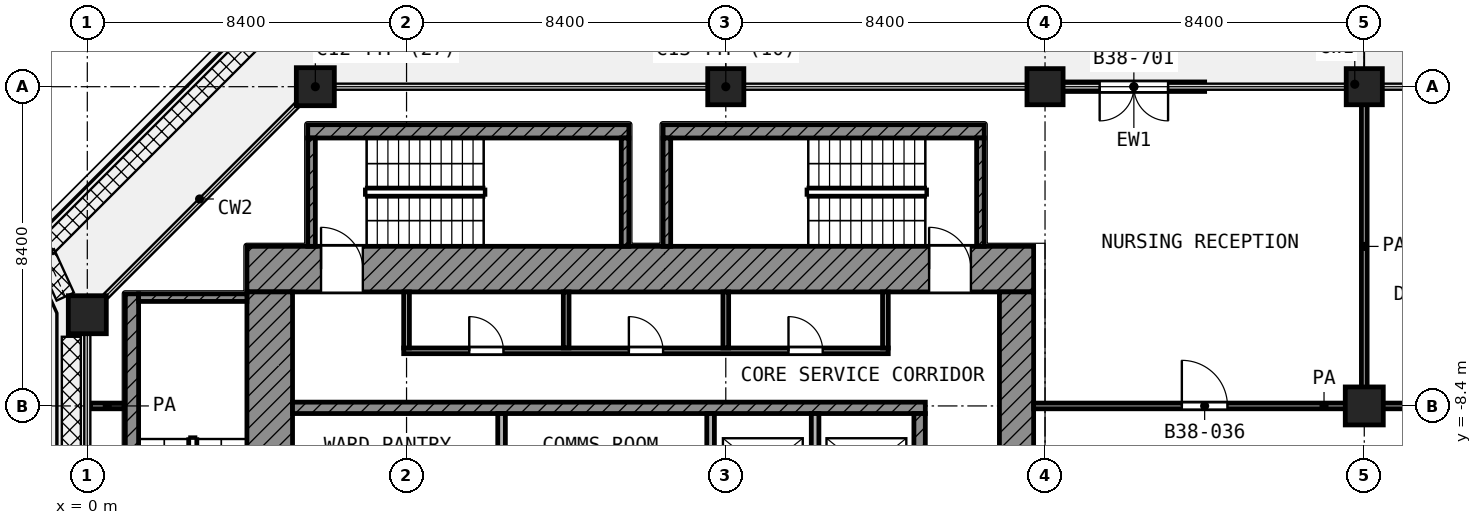
"""IFC4 building model, lengths in metres.
Left out: names, types, materials, properties, quantities, classifications, styles, units other than length and angle.
Written with IfcOpenShell. Run it as: python <this file> out.ifc"""

import sys

from ifc_helpers import new_model, si_unit, direction, frame, frame_2d, origin, origin_2d, place, context, subcontext, project, spatial, rectangle, extrude, element, fill, save


model = new_model("IFC4")
c1 = context("Model", 3, precision=1e-05, world=origin(), true_north=direction((0.0, 1.0)))
c2 = subcontext(c1, "Body", "Model", "MODEL_VIEW")
j1 = project(units=[si_unit("LENGTHUNIT", "METRE"), si_unit("PLANEANGLEUNIT", "RADIAN")], contexts=[c1])
p1 = place(None, origin())
s1 = spatial("IfcSite", under=j1, at=p1, CompositionType="ELEMENT")
p2 = place(p1, origin())
s2 = spatial("IfcBuilding", under=s1, at=p2, CompositionType="ELEMENT")
p3 = place(p2, frame((0.0, 0.0, 166.8)))
s3 = spatial("IfcBuildingStorey", under=s2, at=p3, CompositionType="ELEMENT", Elevation=166.8)
p4 = place(p3, frame((6.0, 0.0, 0.0), z_axis=(0.0, 0.0, 1.0), x_axis=(1.0, 0.0, 0.0)))
e1 = element("IfcColumn", 1, at=p4, inside=s3, PredefinedType="COLUMN", context=c2, shape_type="SweptSolid", body=[
    extrude(rectangle(XDim=1.0, YDim=1.0, at=origin_2d()), origin(), (0.0, 0.0, 1.0), 4.2),
])
for number, where, z_axis, x_axis in (
    (2, (16.8, 0.0, 0.0), (0.0, 0.0, 1.0), (1.0, 0.0, 0.0)),
    (3, (25.2, 0.0, 0.0), (0.0, 0.0, 1.0), (1.0, 0.0, 0.0)),
    (4, (33.6, 0.0, 0.0), (0.0, 0.0, 1.0), (1.0, 0.0, 0.0)),
):
    element("IfcColumn", number, at=place(p3, frame(where, z_axis=z_axis, x_axis=x_axis)), inside=s3, PredefinedType="COLUMN", context=c2, shape_type="SweptSolid", body=[
        extrude(rectangle(XDim=0.95, YDim=0.95, at=origin_2d()), origin(), (0.0, 0.0, 1.0), 4.2),
    ])
for number, where, z_axis, x_axis in (
    (5, (0.0, -6.0, 0.0), (0.0, 0.0, 1.0), (1.0, 0.0, 0.0)),
    (6, (33.6, -8.4, 0.0), (0.0, 0.0, 1.0), (1.0, 0.0, 0.0)),
):
    element("IfcColumn", number, at=place(p3, frame(where, z_axis=z_axis, x_axis=x_axis)), inside=s3, PredefinedType="COLUMN", context=c2, shape_type="SweptSolid", body=[
        extrude(rectangle(XDim=1.0, YDim=1.0, at=origin_2d()), origin(), (0.0, 0.0, 1.0), 4.2),
    ])
p5 = place(p3, frame((29.4, 0.0, 0.0), z_axis=(0.0, 0.0, 1.0), x_axis=(-1.0, 0.0, 0.0)))
e7 = element("IfcWall", 7, at=p5, inside=s3, PredefinedType="SOLIDWALL", context=c2, shape_type="SweptSolid", body=[
    extrude(rectangle(XDim=3.725, YDim=0.25, at=frame_2d((1.862, 0.0))), origin(), (0.0, 0.0, 1.0), 2.58),
])
p6 = place(p5, frame((0.962, 0.0, 0.0)))
e8 = element("IfcOpeningElement", 8, at=p6, cuts=e7, PredefinedType="OPENING", context=c2, shape_type="SweptSolid", body=[
    extrude(rectangle(XDim=1.8, YDim=2.1, at=frame_2d((0.9, 1.05))), frame((0.0, 0.135, 0.0), z_axis=(0.0, -1.0, 0.0), x_axis=(1.0, 0.0, 0.0)), (0.0, 0.0, 1.0), 0.27),
])
p7 = place(p3, frame((4.2, -4.8, 0.0), z_axis=(0.0, 0.0, 1.0), x_axis=(1.0, 0.0, 0.0)))
e9 = element("IfcWall", 9, at=p7, inside=s3, PredefinedType="SHEAR", context=c2, shape_type="SweptSolid", body=[
    extrude(rectangle(XDim=20.7, YDim=1.2, at=frame_2d((10.35, 0.0))), origin(), (0.0, 0.0, 1.0), 3.6),
])
p8 = place(p7, frame((1.95, 0.0, 0.0)))
e10 = element("IfcOpeningElement", 10, at=p8, cuts=e9, PredefinedType="OPENING", context=c2, shape_type="SweptSolid", body=[
    extrude(rectangle(XDim=1.1, YDim=2.1, at=frame_2d((0.55, 1.05))), frame((0.0, 0.61, 0.0), z_axis=(0.0, -1.0, 0.0), x_axis=(1.0, 0.0, 0.0)), (0.0, 0.0, 1.0), 1.22),
])
p9 = place(p7, frame((17.95, 0.0, 0.0)))
e11 = element("IfcOpeningElement", 11, at=p9, cuts=e9, PredefinedType="OPENING", context=c2, shape_type="SweptSolid", body=[
    extrude(rectangle(XDim=1.1, YDim=2.1, at=frame_2d((0.55, 1.05))), frame((0.0, 0.61, 0.0), z_axis=(0.0, -1.0, 0.0), x_axis=(1.0, 0.0, 0.0)), (0.0, 0.0, 1.0), 1.22),
])
p10 = place(p3, frame((4.8, -24.9, 0.0), z_axis=(0.0, 0.0, 1.0), x_axis=(0.0, 1.0, 0.0)))
e12 = element("IfcWall", 12, at=p10, inside=s3, PredefinedType="SHEAR", context=c2, shape_type="SweptSolid", body=[
    extrude(rectangle(XDim=19.5, YDim=1.2, at=frame_2d((9.75, 0.0))), origin(), (0.0, 0.0, 1.0), 3.6),
])
p11 = place(p10, frame((11.35, 0.0, 0.0)))
e13 = element("IfcOpeningElement", 13, at=p11, cuts=e12, PredefinedType="OPENING", context=c2, shape_type="SweptSolid", body=[
    extrude(rectangle(XDim=1.1, YDim=2.1, at=frame_2d((0.55, 1.05))), frame((0.0, 0.61, 0.0), z_axis=(0.0, -1.0, 0.0), x_axis=(1.0, 0.0, 0.0)), (0.0, 0.0, 1.0), 1.22),
])
p12 = place(p10, frame((2.05, 0.0, 0.0)))
e14 = element("IfcOpeningElement", 14, at=p12, cuts=e12, PredefinedType="OPENING", context=c2, shape_type="SweptSolid", body=[
    extrude(rectangle(XDim=1.1, YDim=2.1, at=frame_2d((0.55, 1.05))), frame((0.0, 0.61, 0.0), z_axis=(0.0, -1.0, 0.0), x_axis=(1.0, 0.0, 0.0)), (0.0, 0.0, 1.0), 1.22),
])
p13 = place(p3, frame((24.45, -24.0, 0.0), z_axis=(0.0, 0.0, 1.0), x_axis=(0.0, 1.0, 0.0)))
e15 = element("IfcWall", 15, at=p13, inside=s3, PredefinedType="SHEAR", context=c2, shape_type="SweptSolid", body=[
    extrude(rectangle(XDim=18.6, YDim=0.9, at=frame_2d((9.3, 0.0))), origin(), (0.0, 0.0, 1.0), 3.6),
])
p14 = place(p13, frame((10.5, 0.0, 0.0)))
e16 = element("IfcOpeningElement", 16, at=p14, cuts=e15, PredefinedType="OPENING", context=c2, shape_type="SweptSolid", body=[
    extrude(rectangle(XDim=1.8, YDim=2.1, at=frame_2d((0.9, 1.05))), frame((0.0, 0.46, 0.0), z_axis=(0.0, -1.0, 0.0), x_axis=(1.0, 0.0, 0.0)), (0.0, 0.0, 1.0), 0.92),
])
p15 = place(p3, frame((5.4, -8.45, 0.0), z_axis=(0.0, 0.0, 1.0), x_axis=(1.0, 0.0, 0.0)))
e17 = element("IfcWall", 17, at=p15, inside=s3, PredefinedType="SHEAR", context=c2, shape_type="SweptSolid", body=[
    extrude(rectangle(XDim=16.65, YDim=0.3, at=frame_2d((8.325, 0.0))), origin(), (0.0, 0.0, 1.0), 3.6),
])
p16 = place(p3, frame((21.9, -10.95, 0.0), z_axis=(0.0, 0.0, 1.0), x_axis=(0.0, 1.0, 0.0)))
e18 = element("IfcWall", 18, at=p16, inside=s3, PredefinedType="SHEAR", context=c2, shape_type="SweptSolid", body=[
    extrude(rectangle(XDim=2.35, YDim=0.3, at=frame_2d((1.175, 0.0))), origin(), (0.0, 0.0, 1.0), 3.6),
])
for number, where, z_axis, x_axis in (
    (19, (10.9, -10.95, 0.0), (0.0, 0.0, 1.0), (0.0, 1.0, 0.0)),
    (20, (16.4, -10.95, 0.0), (0.0, 0.0, 1.0), (0.0, 1.0, 0.0)),
    (21, (19.15, -10.95, 0.0), (0.0, 0.0, 1.0), (0.0, 1.0, 0.0)),
):
    element("IfcWall", number, at=place(p3, frame(where, z_axis=z_axis, x_axis=x_axis)), inside=s3, PredefinedType="PARTITIONING", context=c2, shape_type="SweptSolid", body=[
        extrude(rectangle(XDim=2.35, YDim=0.2, at=frame_2d((1.175, 0.0))), origin(), (0.0, 0.0, 1.0), 3.6),
    ])
p17 = place(p3, frame((8.325, -6.95, 0.0), z_axis=(0.0, 0.0, 1.0), x_axis=(1.0, 0.0, 0.0)))
e22 = element("IfcWall", 22, at=p17, inside=s3, PredefinedType="PARTITIONING", context=c2, shape_type="SweptSolid", body=[
    extrude(rectangle(XDim=12.75, YDim=0.15, at=frame_2d((6.375, 0.0))), origin(), (0.0, 0.0, 1.0), 3.6),
])
p18 = place(p17, frame((1.725, 0.0, 0.0)))
e23 = element("IfcOpeningElement", 23, at=p18, cuts=e22, PredefinedType="OPENING", context=c2, shape_type="SweptSolid", body=[
    extrude(rectangle(XDim=0.9, YDim=2.1, at=frame_2d((0.45, 1.05))), frame((0.0, 0.085, 0.0), z_axis=(0.0, -1.0, 0.0), x_axis=(1.0, 0.0, 0.0)), (0.0, 0.0, 1.0), 0.17),
])
p19 = place(p17, frame((5.925, 0.0, 0.0)))
e24 = element("IfcOpeningElement", 24, at=p19, cuts=e22, PredefinedType="OPENING", context=c2, shape_type="SweptSolid", body=[
    extrude(rectangle(XDim=0.9, YDim=2.1, at=frame_2d((0.45, 1.05))), frame((0.0, 0.085, 0.0), z_axis=(0.0, -1.0, 0.0), x_axis=(1.0, 0.0, 0.0)), (0.0, 0.0, 1.0), 0.17),
])
p20 = place(p17, frame((10.125, 0.0, 0.0)))
e25 = element("IfcOpeningElement", 25, at=p20, cuts=e22, PredefinedType="OPENING", context=c2, shape_type="SweptSolid", body=[
    extrude(rectangle(XDim=0.9, YDim=2.1, at=frame_2d((0.45, 1.05))), frame((0.0, 0.085, 0.0), z_axis=(0.0, -1.0, 0.0), x_axis=(1.0, 0.0, 0.0)), (0.0, 0.0, 1.0), 0.17),
])
for number, where, z_axis, x_axis in (
    (26, (8.4, -6.875, 0.0), (0.0, 0.0, 1.0), (0.0, 1.0, 0.0)),
    (27, (12.6, -6.875, 0.0), (0.0, 0.0, 1.0), (0.0, 1.0, 0.0)),
    (28, (16.8, -6.875, 0.0), (0.0, 0.0, 1.0), (0.0, 1.0, 0.0)),
    (29, (21.0, -6.875, 0.0), (0.0, 0.0, 1.0), (0.0, 1.0, 0.0)),
):
    element("IfcWall", number, at=place(p3, frame(where, z_axis=z_axis, x_axis=x_axis)), inside=s3, PredefinedType="PARTITIONING", context=c2, shape_type="SweptSolid", body=[
        extrude(rectangle(XDim=1.475, YDim=0.15, at=frame_2d((0.738, 0.0))), origin(), (0.0, 0.0, 1.0), 3.6),
    ])
p21 = place(p3, frame((1.175, -13.9, 0.0), z_axis=(0.0, 0.0, 1.0), x_axis=(0.0, 1.0, 0.0)))
e30 = element("IfcWall", 30, at=p21, inside=s3, PredefinedType="SHEAR", context=c2, shape_type="SweptSolid", body=[
    extrude(rectangle(XDim=8.45, YDim=0.35, at=frame_2d((4.225, 0.0))), origin(), (0.0, 0.0, 1.0), 3.6),
])
p22 = place(p3, frame((1.35, -5.55, 0.0), z_axis=(0.0, 0.0, 1.0), x_axis=(1.0, 0.0, 0.0)))
e31 = element("IfcWall", 31, at=p22, inside=s3, PredefinedType="SHEAR", context=c2, shape_type="SweptSolid", body=[
    extrude(rectangle(XDim=2.85, YDim=0.2, at=frame_2d((1.425, 0.0))), origin(), (0.0, 0.0, 1.0), 3.6),
])
p23 = place(p3, frame((5.8, -1.175, 0.0), z_axis=(0.0, 0.0, 1.0), x_axis=(1.0, 0.0, 0.0)))
e32 = element("IfcWall", 32, at=p23, inside=s3, PredefinedType="SHEAR", context=c2, shape_type="SweptSolid", body=[
    extrude(rectangle(XDim=8.45, YDim=0.35, at=frame_2d((4.225, 0.0))), origin(), (0.0, 0.0, 1.0), 3.6),
])
for number, where, z_axis, x_axis in (
    (33, (5.9, -4.2, 0.0), (0.0, 0.0, 1.0), (0.0, 1.0, 0.0)),
    (34, (14.15, -4.2, 0.0), (0.0, 0.0, 1.0), (0.0, 1.0, 0.0)),
):
    element("IfcWall", number, at=place(p3, frame(where, z_axis=z_axis, x_axis=x_axis)), inside=s3, PredefinedType="SHEAR", context=c2, shape_type="SweptSolid", body=[
        extrude(rectangle(XDim=2.85, YDim=0.2, at=frame_2d((1.425, 0.0))), origin(), (0.0, 0.0, 1.0), 3.6),
    ])
p24 = place(p3, frame((15.15, -1.175, 0.0), z_axis=(0.0, 0.0, 1.0), x_axis=(1.0, 0.0, 0.0)))
e35 = element("IfcWall", 35, at=p24, inside=s3, PredefinedType="SHEAR", context=c2, shape_type="SweptSolid", body=[
    extrude(rectangle(XDim=8.45, YDim=0.35, at=frame_2d((4.225, 0.0))), origin(), (0.0, 0.0, 1.0), 3.6),
])
for number, where, z_axis, x_axis in (
    (36, (15.25, -4.2, 0.0), (0.0, 0.0, 1.0), (0.0, 1.0, 0.0)),
    (37, (23.5, -4.2, 0.0), (0.0, 0.0, 1.0), (0.0, 1.0, 0.0)),
):
    element("IfcWall", number, at=place(p3, frame(where, z_axis=z_axis, x_axis=x_axis)), inside=s3, PredefinedType="SHEAR", context=c2, shape_type="SweptSolid", body=[
        extrude(rectangle(XDim=2.85, YDim=0.2, at=frame_2d((1.425, 0.0))), origin(), (0.0, 0.0, 1.0), 3.6),
    ])
p25 = place(p3, frame((0.08, -8.4, 0.0), z_axis=(0.0, 0.0, 1.0), x_axis=(1.0, 0.0, 0.0)))
e38 = element("IfcWall", 38, at=p25, inside=s3, PredefinedType="PARTITIONING", context=c2, shape_type="SweptSolid", body=[
    extrude(rectangle(XDim=0.89, YDim=0.15, at=frame_2d((0.445, 0.0))), origin(), (0.0, 0.0, 1.0), 3.6),
])
p26 = place(p3, frame((24.9, -8.4, 0.0), z_axis=(0.0, 0.0, 1.0), x_axis=(1.0, 0.0, 0.0)))
e39 = element("IfcWall", 39, at=p26, inside=s3, PredefinedType="PARTITIONING", context=c2, shape_type="SweptSolid", body=[
    extrude(rectangle(XDim=15.282, YDim=0.15, at=frame_2d((7.641, 0.0))), origin(), (0.0, 0.0, 1.0), 3.6),
])
p27 = place(p26, frame((3.9, 0.0, 0.0)))
e40 = element("IfcOpeningElement", 40, at=p27, cuts=e39, PredefinedType="OPENING", context=c2, shape_type="SweptSolid", body=[
    extrude(rectangle(XDim=1.2, YDim=2.1, at=frame_2d((0.6, 1.05))), frame((0.0, 0.085, 0.0), z_axis=(0.0, -1.0, 0.0), x_axis=(1.0, 0.0, 0.0)), (0.0, 0.0, 1.0), 0.17),
])
p28 = place(p26, frame((10.3, 0.0, 0.0)))
e41 = element("IfcOpeningElement", 41, at=p28, cuts=e39, PredefinedType="OPENING", context=c2, shape_type="SweptSolid", body=[
    extrude(rectangle(XDim=1.0, YDim=2.1, at=frame_2d((0.5, 1.05))), frame((0.0, 0.085, 0.0), z_axis=(0.0, -1.0, 0.0), x_axis=(1.0, 0.0, 0.0)), (0.0, 0.0, 1.0), 0.17),
])
p29 = place(p3, frame((33.6, -8.325, 0.0), z_axis=(0.0, 0.0, 1.0), x_axis=(0.0, 1.0, 0.0)))
e42 = element("IfcWall", 42, at=p29, inside=s3, PredefinedType="PARTITIONING", context=c2, shape_type="SweptSolid", body=[
    extrude(rectangle(XDim=8.245, YDim=0.15, at=frame_2d((4.123, 0.0))), origin(), (0.0, 0.0, 1.0), 3.6),
])
p30 = place(p6, origin())
e43 = element("IfcDoor", 43, at=p30, inside=s3, OperationType="DOUBLE_DOOR_SINGLE_SWING", PredefinedType="DOOR", context=c2, shape_type="SweptSolid", body=[
    extrude(rectangle(XDim=1.8, YDim=2.1, at=frame_2d((0.9, 1.05))), frame((0.0, 0.025, 0.0), z_axis=(0.0, -1.0, 0.0), x_axis=(1.0, 0.0, 0.0)), (0.0, 0.0, 1.0), 0.05),
])
fill(e8, e43)
p31 = place(p8, origin())
e44 = element("IfcDoor", 44, at=p31, inside=s3, OperationType="SINGLE_SWING_LEFT", PredefinedType="DOOR", context=c2, shape_type="SweptSolid", body=[
    extrude(rectangle(XDim=1.1, YDim=2.1, at=frame_2d((0.55, 1.05))), frame((0.0, 0.025, 0.0), z_axis=(0.0, -1.0, 0.0), x_axis=(1.0, 0.0, 0.0)), (0.0, 0.0, 1.0), 0.05),
])
fill(e10, e44)
p32 = place(p9, origin())
e45 = element("IfcDoor", 45, at=p32, inside=s3, OperationType="SINGLE_SWING_LEFT", PredefinedType="DOOR", context=c2, shape_type="SweptSolid", body=[
    extrude(rectangle(XDim=1.1, YDim=2.1, at=frame_2d((0.55, 1.05))), frame((0.0, 0.025, 0.0), z_axis=(0.0, -1.0, 0.0), x_axis=(1.0, 0.0, 0.0)), (0.0, 0.0, 1.0), 0.05),
])
fill(e11, e45)
p33 = place(p18, origin())
e46 = element("IfcDoor", 46, at=p33, inside=s3, OperationType="SINGLE_SWING_LEFT", PredefinedType="DOOR", context=c2, shape_type="SweptSolid", body=[
    extrude(rectangle(XDim=0.9, YDim=2.1, at=frame_2d((0.45, 1.05))), frame((0.0, 0.025, 0.0), z_axis=(0.0, -1.0, 0.0), x_axis=(1.0, 0.0, 0.0)), (0.0, 0.0, 1.0), 0.05),
])
fill(e23, e46)
p34 = place(p19, origin())
e47 = element("IfcDoor", 47, at=p34, inside=s3, OperationType="SINGLE_SWING_LEFT", PredefinedType="DOOR", context=c2, shape_type="SweptSolid", body=[
    extrude(rectangle(XDim=0.9, YDim=2.1, at=frame_2d((0.45, 1.05))), frame((0.0, 0.025, 0.0), z_axis=(0.0, -1.0, 0.0), x_axis=(1.0, 0.0, 0.0)), (0.0, 0.0, 1.0), 0.05),
])
fill(e24, e47)
p35 = place(p20, origin())
e48 = element("IfcDoor", 48, at=p35, inside=s3, OperationType="SINGLE_SWING_LEFT", PredefinedType="DOOR", context=c2, shape_type="SweptSolid", body=[
    extrude(rectangle(XDim=0.9, YDim=2.1, at=frame_2d((0.45, 1.05))), frame((0.0, 0.025, 0.0), z_axis=(0.0, -1.0, 0.0), x_axis=(1.0, 0.0, 0.0)), (0.0, 0.0, 1.0), 0.05),
])
fill(e25, e48)
p36 = place(p27, origin())
e49 = element("IfcDoor", 49, at=p36, inside=s3, OperationType="SINGLE_SWING_LEFT", PredefinedType="DOOR", context=c2, shape_type="SweptSolid", body=[
    extrude(rectangle(XDim=1.2, YDim=2.1, at=frame_2d((0.6, 1.05))), frame((0.0, 0.025, 0.0), z_axis=(0.0, -1.0, 0.0), x_axis=(1.0, 0.0, 0.0)), (0.0, 0.0, 1.0), 0.05),
])
fill(e40, e49)
save(model, sys.argv[1])
